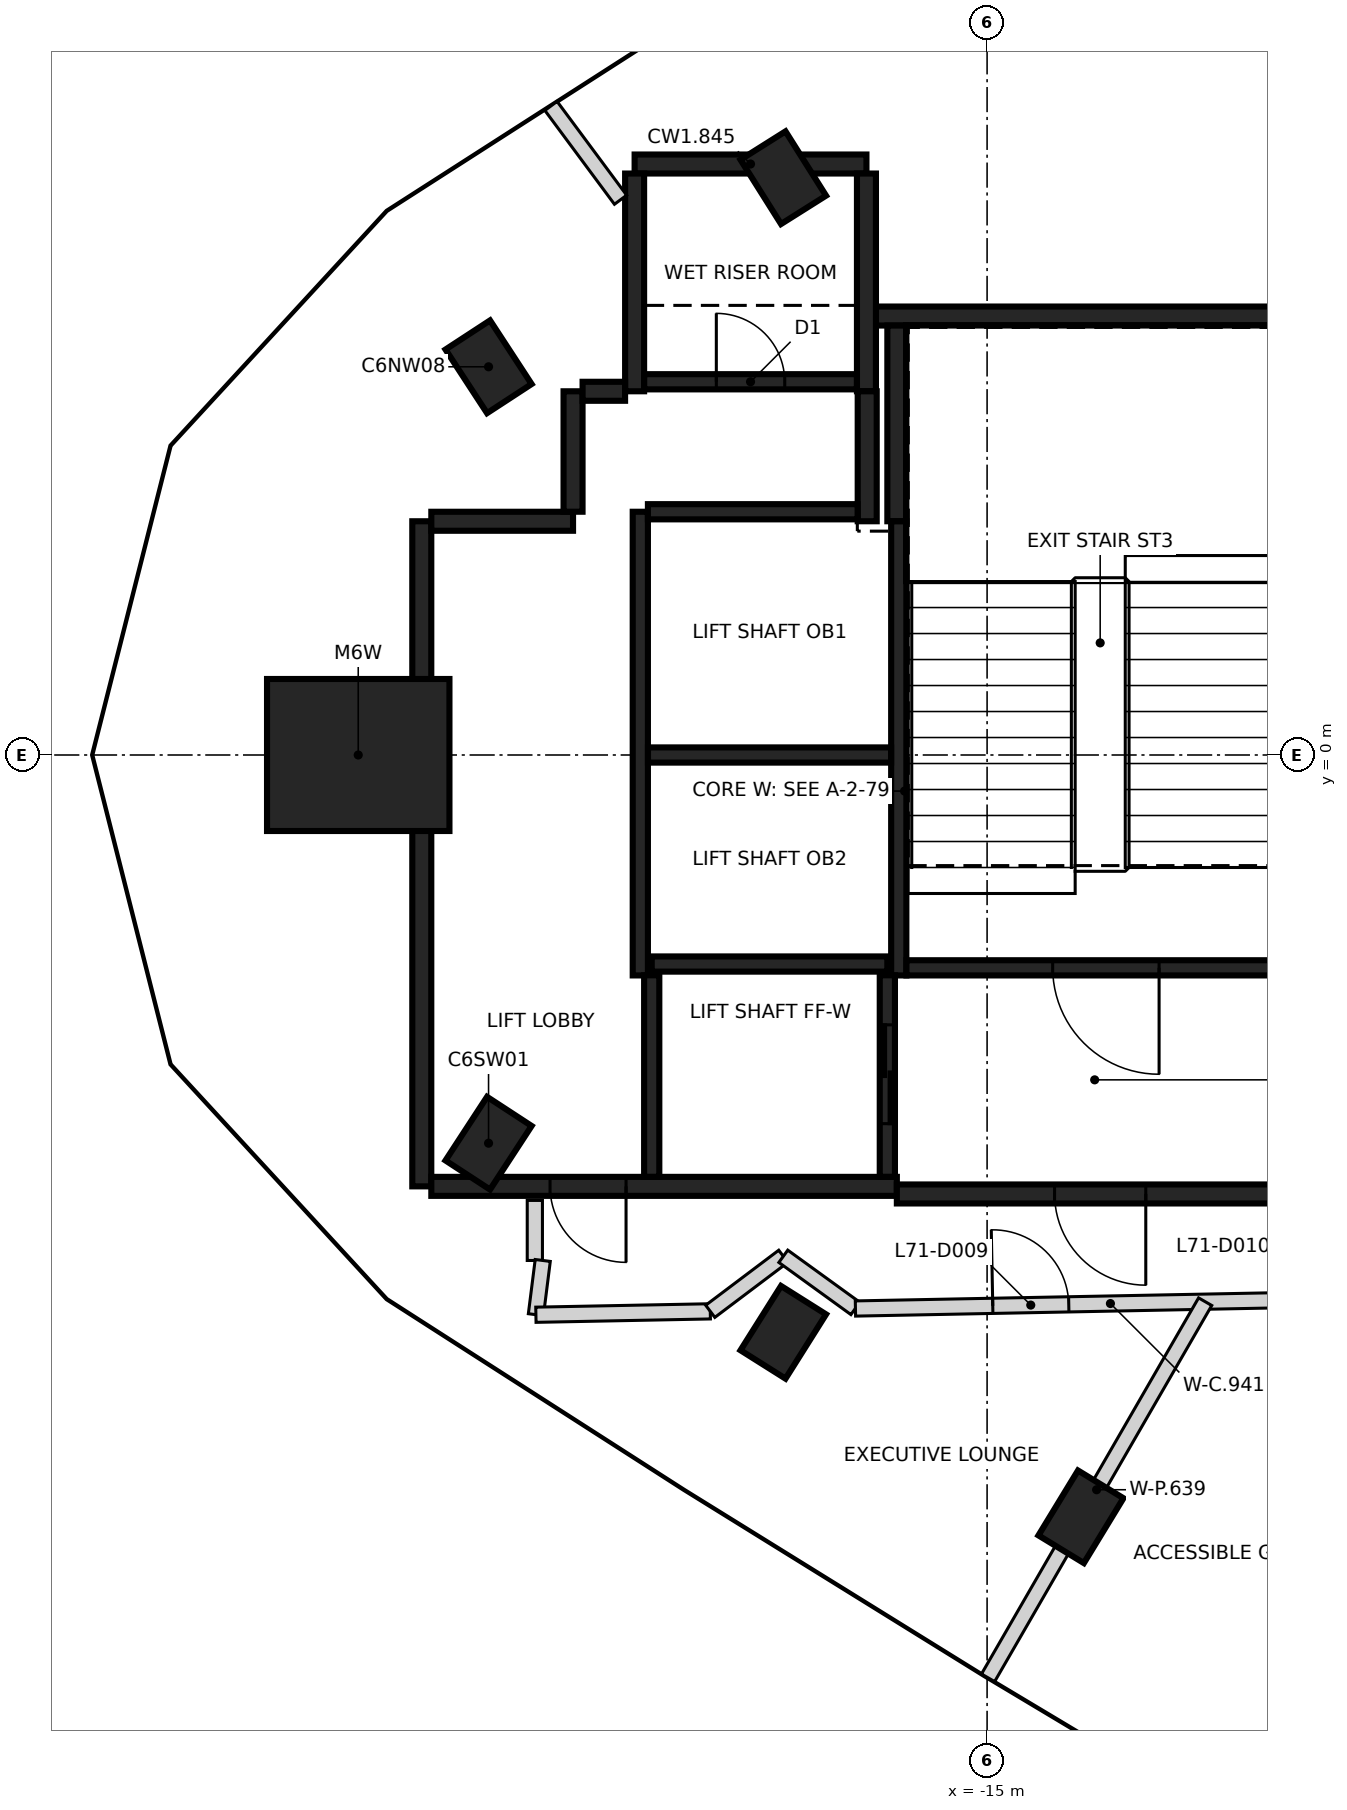
"""IFC4 building model, lengths in metres.
Left out: names, types, materials, properties, quantities, classifications, styles, units other than length and angle.
Written with IfcOpenShell. Run it as: python <this file> out.ifc"""

import sys

from ifc_helpers import new_model, si_unit, direction, frame, frame_2d, origin, origin_2d, place, context, subcontext, project, spatial, rectangle, extrude, element, fill, save


model = new_model("IFC4")
c1 = context("Model", 3, precision=1e-05, world=origin(), true_north=direction((0.0, 1.0)))
c2 = subcontext(c1, "Body", "Model", "MODEL_VIEW")
j1 = project(units=[si_unit("LENGTHUNIT", "METRE"), si_unit("PLANEANGLEUNIT", "RADIAN")], contexts=[c1])
p1 = place(None, origin())
s1 = spatial("IfcSite", under=j1, at=p1, CompositionType="ELEMENT")
p2 = place(p1, origin())
s2 = spatial("IfcBuilding", under=s1, at=p2, CompositionType="ELEMENT")
p3 = place(p2, frame((0.0, 0.0, 280.2)))
s3 = spatial("IfcBuildingStorey", under=s2, at=p3, CompositionType="ELEMENT", Elevation=280.2)
for number, where, z_axis, x_axis in (
    (1, (-17.681, 7.595, -0.35), (0.0, 0.0, 1.0), (-0.533, 0.846, 0.0)),
    (2, (-21.559, 5.107, -0.35), (0.0, 0.0, 1.0), (-0.547, 0.837, 0.0)),
    (3, (-21.559, -5.107, -0.35), (0.0, 0.0, 1.0), (0.547, 0.837, 0.0)),
    (4, (-17.681, -7.595, -0.35), (0.0, 0.0, 1.0), (0.533, 0.846, 0.0)),
    (5, (-13.765, -10.022, -0.35), (0.0, 0.0, 1.0), (0.52, 0.854, 0.0)),
):
    element("IfcColumn", number, at=place(p3, frame(where, z_axis=z_axis, x_axis=x_axis)), inside=s3, PredefinedType="COLUMN", context=c2, shape_type="SweptSolid", body=[
        extrude(rectangle(XDim=1.0, YDim=0.7, at=origin_2d()), origin(), (0.0, 0.0, 1.0), 3.6),
    ])
p4 = place(p3, frame((-23.273, 0.0, -0.35), z_axis=(0.0, 0.0, 1.0), x_axis=(1.0, 0.0, 0.0)))
e6 = element("IfcColumn", 6, at=p4, inside=s3, PredefinedType="COLUMN", context=c2, shape_type="SweptSolid", body=[
    extrude(rectangle(XDim=2.4, YDim=2.0, at=origin_2d()), origin(), (0.0, 0.0, 1.0), 3.6),
])
p5 = place(p3, frame((-22.437, -5.675, 0.0), z_axis=(0.0, 0.0, 1.0), x_axis=(0.0, 1.0, 0.0)))
e7 = element("IfcWall", 7, at=p5, inside=s3, PredefinedType="SHEAR", context=c2, shape_type="SweptSolid", body=[
    extrude(rectangle(XDim=8.75, YDim=0.25, at=frame_2d((4.375, 0.0))), origin(), (0.0, 0.0, 1.0), 3.25),
])
p6 = place(p3, frame((-16.187, -5.675, 0.0), z_axis=(0.0, 0.0, 1.0), x_axis=(-1.0, 0.0, 0.0)))
e8 = element("IfcWall", 8, at=p6, inside=s3, PredefinedType="SHEAR", context=c2, shape_type="SweptSolid", body=[
    extrude(rectangle(XDim=6.125, YDim=0.25, at=frame_2d((3.062, 0.0))), origin(), (0.0, 0.0, 1.0), 3.25),
])
p7 = place(p6, frame((3.563, 0.0, 0.0)))
e9 = element("IfcOpeningElement", 9, at=p7, cuts=e8, PredefinedType="OPENING", context=c2, shape_type="SweptSolid", body=[
    extrude(rectangle(XDim=1.0, YDim=2.1, at=frame_2d((0.5, 1.05))), frame((0.0, 0.135, 0.0), z_axis=(0.0, -1.0, 0.0), x_axis=(1.0, 0.0, 0.0)), (0.0, 0.0, 1.0), 0.27),
])
p8 = place(p3, frame((-10.963, -5.775, 0.0), z_axis=(0.0, 0.0, 1.0), x_axis=(-1.0, 0.0, 0.0)))
e10 = element("IfcWall", 10, at=p8, inside=s3, PredefinedType="SHEAR", context=c2, shape_type="SweptSolid", body=[
    extrude(rectangle(XDim=5.225, YDim=0.25, at=frame_2d((2.612, 0.0))), origin(), (0.0, 0.0, 1.0), 3.25),
])
p9 = place(p8, frame((1.95, 0.0, 0.0)))
e11 = element("IfcOpeningElement", 11, at=p9, cuts=e10, PredefinedType="OPENING", context=c2, shape_type="SweptSolid", body=[
    extrude(rectangle(XDim=1.2, YDim=2.1, at=frame_2d((0.6, 1.05))), frame((0.0, 0.135, 0.0), z_axis=(0.0, -1.0, 0.0), x_axis=(1.0, 0.0, 0.0)), (0.0, 0.0, 1.0), 0.27),
])
p10 = place(p3, frame((-16.472, 5.775, 0.0), z_axis=(0.0, 0.0, 1.0), x_axis=(1.0, 0.0, 0.0)))
e12 = element("IfcWall", 12, at=p10, inside=s3, PredefinedType="SHEAR", context=c2, shape_type="SweptSolid", body=[
    extrude(rectangle(XDim=5.51, YDim=0.25, at=frame_2d((2.755, 0.0))), origin(), (0.0, 0.0, 1.0), 3.25),
])
p11 = place(p3, frame((-19.637, 7.775, 0.0), z_axis=(0.0, 0.0, 1.0), x_axis=(1.0, 0.0, 0.0)))
e13 = element("IfcWall", 13, at=p11, inside=s3, PredefinedType="SHEAR", context=c2, shape_type="SweptSolid", body=[
    extrude(rectangle(XDim=3.05, YDim=0.25, at=frame_2d((1.525, 0.0))), origin(), (0.0, 0.0, 1.0), 3.25),
])
for number, where, z_axis, x_axis in (
    (14, (-16.587, 7.65, 0.0), (0.0, 0.0, 1.0), (0.0, -1.0, 0.0)),
    (15, (-19.637, 4.785, 0.0), (0.0, 0.0, 1.0), (0.0, 1.0, 0.0)),
):
    element("IfcWall", number, at=place(p3, frame(where, z_axis=z_axis, x_axis=x_axis)), inside=s3, PredefinedType="SHEAR", context=c2, shape_type="SweptSolid", body=[
        extrude(rectangle(XDim=2.865, YDim=0.25, at=frame_2d((1.432, 0.0))), origin(), (0.0, 0.0, 1.0), 3.25),
    ])
p12 = place(p3, frame((-16.187, 3.075, 0.0), z_axis=(0.0, 0.0, 1.0), x_axis=(0.0, 1.0, 0.0)))
e16 = element("IfcWall", 16, at=p12, inside=s3, PredefinedType="SHEAR", context=c2, shape_type="SweptSolid", body=[
    extrude(rectangle(XDim=2.575, YDim=0.25, at=frame_2d((1.287, 0.0))), origin(), (0.0, 0.0, 1.0), 3.25),
])
p13 = place(p3, frame((-22.312, 3.075, 0.0), z_axis=(0.0, 0.0, 1.0), x_axis=(1.0, 0.0, 0.0)))
e17 = element("IfcWall", 17, at=p13, inside=s3, PredefinedType="SHEAR", context=c2, shape_type="SweptSolid", body=[
    extrude(rectangle(XDim=1.865, YDim=0.25, at=frame_2d((0.932, 0.0))), origin(), (0.0, 0.0, 1.0), 3.25),
])
p14 = place(p3, frame((-16.577, 4.785, 0.0), z_axis=(0.0, 0.0, 1.0), x_axis=(0.0, -1.0, 0.0)))
e18 = element("IfcWall", 18, at=p14, inside=s3, PredefinedType="SHEAR", context=c2, shape_type="SweptSolid", body=[
    extrude(rectangle(XDim=1.71, YDim=0.25, at=frame_2d((0.855, 0.0))), origin(), (0.0, 0.0, 1.0), 3.25),
])
p15 = place(p3, frame((-20.447, 3.2, 0.0), z_axis=(0.0, 0.0, 1.0), x_axis=(0.0, 1.0, 0.0)))
e19 = element("IfcWall", 19, at=p15, inside=s3, PredefinedType="SHEAR", context=c2, shape_type="SweptSolid", body=[
    extrude(rectangle(XDim=1.584, YDim=0.25, at=frame_2d((0.792, 0.0))), origin(), (0.0, 0.0, 1.0), 3.25),
])
p16 = place(p3, frame((-20.322, 4.785, 0.0), z_axis=(0.0, 0.0, 1.0), x_axis=(1.0, 0.0, 0.0)))
e20 = element("IfcWall", 20, at=p16, inside=s3, PredefinedType="SHEAR", context=c2, shape_type="SweptSolid", body=[
    extrude(rectangle(XDim=0.559, YDim=0.25, at=frame_2d((0.28, 0.0))), origin(), (0.0, 0.0, 1.0), 3.25),
])
p17 = place(p3, frame((-16.162, 3.074, 0.0), z_axis=(0.0, 0.0, 1.0), x_axis=(0.0, -1.0, 0.0)))
e21 = element("IfcWall", 21, at=p17, inside=s3, PredefinedType="SHEAR", context=c2, shape_type="SweptSolid", body=[
    extrude(rectangle(XDim=5.974, YDim=0.2, at=frame_2d((2.987, 0.0))), origin(), (0.0, 0.0, 1.0), 3.25),
])
p18 = place(p3, frame((-19.562, -2.9, 0.0), z_axis=(0.0, 0.0, 1.0), x_axis=(0.0, 1.0, 0.0)))
e22 = element("IfcWall", 22, at=p18, inside=s3, PredefinedType="SHEAR", context=c2, shape_type="SweptSolid", body=[
    extrude(rectangle(XDim=6.1, YDim=0.2, at=frame_2d((3.05, 0.0))), origin(), (0.0, 0.0, 1.0), 3.25),
])
p19 = place(p3, frame((-10.963, -2.8, 0.0), z_axis=(0.0, 0.0, 1.0), x_axis=(-1.0, 0.0, 0.0)))
e23 = element("IfcWall", 23, at=p19, inside=s3, PredefinedType="SHEAR", context=c2, shape_type="SweptSolid", body=[
    extrude(rectangle(XDim=5.098, YDim=0.2, at=frame_2d((2.549, 0.0))), origin(), (0.0, 0.0, 1.0), 3.25),
])
p20 = place(p19, frame((1.774, 0.0, 0.0)))
e24 = element("IfcOpeningElement", 24, at=p20, cuts=e23, PredefinedType="OPENING", context=c2, shape_type="SweptSolid", body=[
    extrude(rectangle(XDim=1.4, YDim=2.1, at=frame_2d((0.7, 1.05))), frame((0.0, 0.11, 0.0), z_axis=(0.0, -1.0, 0.0), x_axis=(1.0, 0.0, 0.0)), (0.0, 0.0, 1.0), 0.22),
])
p21 = place(p3, frame((-16.263, 0.0, 0.0), z_axis=(0.0, 0.0, 1.0), x_axis=(-1.0, 0.0, 0.0)))
e25 = element("IfcWall", 25, at=p21, inside=s3, PredefinedType="SHEAR", context=c2, shape_type="SweptSolid", body=[
    extrude(rectangle(XDim=3.198, YDim=0.2, at=frame_2d((1.599, 0.0))), origin(), (0.0, 0.0, 1.0), 3.25),
])
p22 = place(p3, frame((-19.511, 4.91, 0.0), z_axis=(0.0, 0.0, 1.0), x_axis=(1.0, 0.0, 0.0)))
e26 = element("IfcWall", 26, at=p22, inside=s3, PredefinedType="SHEAR", context=c2, shape_type="SweptSolid", body=[
    extrude(rectangle(XDim=2.798, YDim=0.2, at=frame_2d((1.399, 0.0))), origin(), (0.0, 0.0, 1.0), 3.25),
])
p23 = place(p22, frame((0.949, 0.0, 0.0)))
e27 = element("IfcOpeningElement", 27, at=p23, cuts=e26, PredefinedType="OPENING", context=c2, shape_type="SweptSolid", body=[
    extrude(rectangle(XDim=0.9, YDim=2.1, at=frame_2d((0.45, 1.05))), frame((0.0, 0.11, 0.0), z_axis=(0.0, -1.0, 0.0), x_axis=(1.0, 0.0, 0.0)), (0.0, 0.0, 1.0), 0.22),
])
p24 = place(p3, frame((-19.462, 3.2, 0.0), z_axis=(0.0, 0.0, 1.0), x_axis=(1.0, 0.0, 0.0)))
e28 = element("IfcWall", 28, at=p24, inside=s3, PredefinedType="SHEAR", context=c2, shape_type="SweptSolid", body=[
    extrude(rectangle(XDim=2.759, YDim=0.2, at=frame_2d((1.379, 0.0))), origin(), (0.0, 0.0, 1.0), 3.25),
])
p25 = place(p3, frame((-19.412, -2.75, 0.0), z_axis=(0.0, 0.0, 1.0), x_axis=(1.0, 0.0, 0.0)))
e29 = element("IfcWall", 29, at=p25, inside=s3, PredefinedType="SHEAR", context=c2, shape_type="SweptSolid", body=[
    extrude(rectangle(XDim=3.1, YDim=0.2, at=frame_2d((1.55, 0.0))), origin(), (0.0, 0.0, 1.0), 3.25),
])
p26 = place(p3, frame((-16.312, -2.898, 0.0), z_axis=(0.0, 0.0, 1.0), x_axis=(0.0, -1.0, 0.0)))
e30 = element("IfcWall", 30, at=p26, inside=s3, PredefinedType="SHEAR", context=c2, shape_type="SweptSolid", body=[
    extrude(rectangle(XDim=2.651, YDim=0.2, at=frame_2d((1.325, 0.0))), origin(), (0.0, 0.0, 1.0), 3.25),
])
p27 = place(p26, frame((0.652, 0.0, 0.0)))
e31 = element("IfcOpeningElement", 31, at=p27, cuts=e30, PredefinedType="OPENING", context=c2, shape_type="SweptSolid", body=[
    extrude(rectangle(XDim=1.3, YDim=2.1, at=frame_2d((0.65, 1.05))), frame((0.0, 0.11, 0.0), z_axis=(0.0, -1.0, 0.0), x_axis=(1.0, 0.0, 0.0)), (0.0, 0.0, 1.0), 0.22),
])
p28 = place(p3, frame((-19.412, -5.549, 0.0), z_axis=(0.0, 0.0, 1.0), x_axis=(0.0, 1.0, 0.0)))
e32 = element("IfcWall", 32, at=p28, inside=s3, PredefinedType="SHEAR", context=c2, shape_type="SweptSolid", body=[
    extrude(rectangle(XDim=2.651, YDim=0.2, at=frame_2d((1.325, 0.0))), origin(), (0.0, 0.0, 1.0), 3.25),
])
p29 = place(p3, frame((-20.95, -6.65, 0.0), z_axis=(0.0, 0.0, 1.0), x_axis=(0.0, 1.0, 0.0)))
e33 = element("IfcWall", 33, at=p29, inside=s3, PredefinedType="PARTITIONING", context=c2, shape_type="SweptSolid", body=[
    extrude(rectangle(XDim=0.79, YDim=0.2, at=frame_2d((0.395, 0.0))), origin(), (0.0, 0.0, 1.0), 3.25),
])
p30 = place(p3, frame((-20.936, -7.363, 0.0), z_axis=(0.0, 0.0, 1.0), x_axis=(0.125330520795, 0.992115044013, 0.0)))
e34 = element("IfcWall", 34, at=p30, inside=s3, PredefinedType="PARTITIONING", context=c2, shape_type="SweptSolid", body=[
    extrude(rectangle(XDim=0.719, YDim=0.2, at=frame_2d((0.359, 0.0))), origin(), (0.0, 0.0, 1.0), 3.25),
])
p31 = place(p3, frame((-20.936, -7.364, 0.0), z_axis=(0.0, 0.0, 1.0), x_axis=(0.999810389391, 0.019472679998, 0.0)))
e35 = element("IfcWall", 35, at=p31, inside=s3, PredefinedType="PARTITIONING", context=c2, shape_type="SweptSolid", body=[
    extrude(rectangle(XDim=2.294, YDim=0.2, at=frame_2d((1.147, 0.0))), origin(), (0.0, 0.0, 1.0), 3.25),
])
p32 = place(p3, frame((-18.642, -7.319, 0.0), z_axis=(0.0, 0.0, 1.0), x_axis=(0.798707882989, 0.601718968998, 0.0)))
e36 = element("IfcWall", 36, at=p32, inside=s3, PredefinedType="PARTITIONING", context=c2, shape_type="SweptSolid", body=[
    extrude(rectangle(XDim=1.203, YDim=0.2, at=frame_2d((0.602, 0.0))), origin(), (0.0, 0.0, 1.0), 2.35),
])
p33 = place(p3, frame((-17.681, -6.595, 0.0), z_axis=(0.0, 0.0, 1.0), x_axis=(0.810123213102, -0.586259652026, 0.0)))
e37 = element("IfcWall", 37, at=p33, inside=s3, PredefinedType="PARTITIONING", context=c2, shape_type="SweptSolid", body=[
    extrude(rectangle(XDim=1.17, YDim=0.2, at=frame_2d((0.585, 0.0))), origin(), (0.0, 0.0, 1.0), 3.25),
])
p34 = place(p3, frame((-16.732, -7.282, 0.0), z_axis=(0.0, 0.0, 1.0), x_axis=(0.999809829903, 0.019501385329, 0.0)))
e38 = element("IfcWall", 38, at=p34, inside=s3, PredefinedType="PARTITIONING", context=c2, shape_type="SweptSolid", body=[
    extrude(rectangle(XDim=6.71, YDim=0.2, at=frame_2d((3.355, 0.0))), origin(), (0.0, 0.0, 1.0), 3.25),
])
p35 = place(p34, frame((1.807, 0.0, 0.0)))
e39 = element("IfcOpeningElement", 39, at=p35, cuts=e38, PredefinedType="OPENING", context=c2, shape_type="SweptSolid", body=[
    extrude(rectangle(XDim=1.0, YDim=2.1, at=frame_2d((0.5, 1.05))), frame((0.0, 0.11, 0.0), z_axis=(0.0, -1.0, 0.0), x_axis=(1.0, 0.0, 0.0)), (0.0, 0.0, 1.0), 0.22),
])
p36 = place(p34, frame((5.51, 0.0, 0.0)))
e40 = element("IfcOpeningElement", 40, at=p36, cuts=e38, PredefinedType="OPENING", context=c2, shape_type="SweptSolid", body=[
    extrude(rectangle(XDim=1.0, YDim=2.1, at=frame_2d((0.5, 1.05))), frame((0.0, 0.11, 0.0), z_axis=(0.0, -1.0, 0.0), x_axis=(1.0, 0.0, 0.0)), (0.0, 0.0, 1.0), 0.22),
])
p37 = place(p3, frame((-20.738, 8.539, 0.0), z_axis=(0.0, 0.0, 1.0), x_axis=(0.595694844153, -0.803210839475, 0.0)))
e41 = element("IfcWall", 41, at=p37, inside=s3, PredefinedType="PARTITIONING", context=c2, shape_type="SweptSolid", body=[
    extrude(rectangle(XDim=1.536, YDim=0.2, at=frame_2d((0.768, 0.0))), origin(), (0.0, 0.0, 1.0), 3.25),
])
p38 = place(p3, frame((-14.987, -12.14, 0.0), z_axis=(0.0, 0.0, 1.0), x_axis=(0.499912336857, 0.866076010208, 0.0)))
e42 = element("IfcWall", 42, at=p38, inside=s3, PredefinedType="PARTITIONING", context=c2, shape_type="SweptSolid", body=[
    extrude(rectangle(XDim=5.713, YDim=0.2, at=frame_2d((2.857, 0.0))), origin(), (0.0, 0.0, 1.0), 3.25),
])
p39 = place(p27, origin())
e43 = element("IfcDoor", 43, at=p39, inside=s3, OperationType="SLIDING_TO_LEFT", PredefinedType="DOOR", context=c2, shape_type="SweptSolid", body=[
    extrude(rectangle(XDim=1.3, YDim=2.1, at=frame_2d((0.65, 1.05))), frame((0.0, 0.025, 0.0), z_axis=(0.0, -1.0, 0.0), x_axis=(1.0, 0.0, 0.0)), (0.0, 0.0, 1.0), 0.05),
])
fill(e31, e43)
p40 = place(p7, origin())
e44 = element("IfcDoor", 44, at=p40, inside=s3, OperationType="SINGLE_SWING_LEFT", PredefinedType="DOOR", context=c2, shape_type="SweptSolid", body=[
    extrude(rectangle(XDim=1.0, YDim=2.1, at=frame_2d((0.5, 1.05))), frame((0.0, 0.025, 0.0), z_axis=(0.0, -1.0, 0.0), x_axis=(1.0, 0.0, 0.0)), (0.0, 0.0, 1.0), 0.05),
])
fill(e9, e44)
p41 = place(p20, origin())
e45 = element("IfcDoor", 45, at=p41, inside=s3, OperationType="SINGLE_SWING_LEFT", PredefinedType="DOOR", context=c2, shape_type="SweptSolid", body=[
    extrude(rectangle(XDim=1.4, YDim=2.1, at=frame_2d((0.7, 1.05))), frame((0.0, 0.025, 0.0), z_axis=(0.0, -1.0, 0.0), x_axis=(1.0, 0.0, 0.0)), (0.0, 0.0, 1.0), 0.05),
])
fill(e24, e45)
p42 = place(p23, origin())
e46 = element("IfcDoor", 46, at=p42, inside=s3, OperationType="SINGLE_SWING_RIGHT", PredefinedType="DOOR", context=c2, shape_type="SweptSolid", body=[
    extrude(rectangle(XDim=0.9, YDim=2.1, at=frame_2d((0.45, 1.05))), frame((0.0, 0.025, 0.0), z_axis=(0.0, -1.0, 0.0), x_axis=(1.0, 0.0, 0.0)), (0.0, 0.0, 1.0), 0.05),
])
fill(e27, e46)
p43 = place(p9, origin())
e47 = element("IfcDoor", 47, at=p43, inside=s3, OperationType="SINGLE_SWING_RIGHT", PredefinedType="DOOR", context=c2, shape_type="SweptSolid", body=[
    extrude(rectangle(XDim=1.2, YDim=2.1, at=frame_2d((0.6, 1.05))), frame((0.0, 0.025, 0.0), z_axis=(0.0, -1.0, 0.0), x_axis=(1.0, 0.0, 0.0)), (0.0, 0.0, 1.0), 0.05),
])
fill(e11, e47)
p44 = place(p35, origin())
e48 = element("IfcDoor", 48, at=p44, inside=s3, OperationType="SINGLE_SWING_LEFT", PredefinedType="DOOR", context=c2, shape_type="SweptSolid", body=[
    extrude(rectangle(XDim=1.0, YDim=2.1, at=frame_2d((0.5, 1.05))), frame((0.0, 0.025, 0.0), z_axis=(0.0, -1.0, 0.0), x_axis=(1.0, 0.0, 0.0)), (0.0, 0.0, 1.0), 0.05),
])
fill(e39, e48)
save(model, sys.argv[1])
